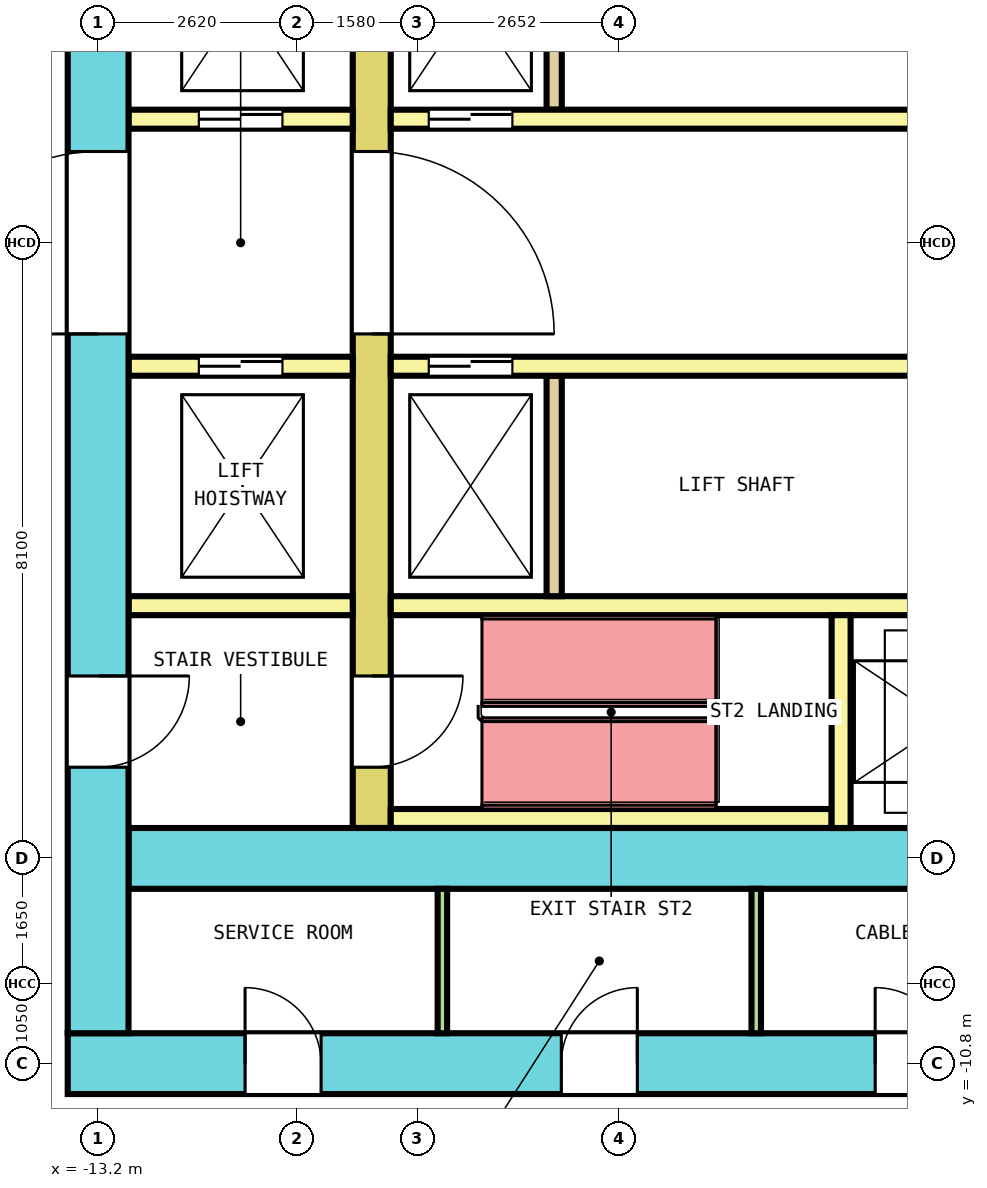
"""IFC4 building model, lengths in metres.
Left out: names, types, materials, properties, quantities, classifications, styles, units other than length and angle.
Written with IfcOpenShell. Run it as: python <this file> out.ifc"""

import sys

from ifc_helpers import new_model, si_unit, direction, frame, frame_2d, origin, place, context, subcontext, project, spatial, rectangle, extrude, element, fill, save


model = new_model("IFC4")
c1 = context("Model", 3, precision=1e-05, world=origin(), true_north=direction((0.0, 1.0)))
c2 = subcontext(c1, "Body", "Model", "MODEL_VIEW")
j1 = project(units=[si_unit("LENGTHUNIT", "METRE"), si_unit("PLANEANGLEUNIT", "RADIAN")], contexts=[c1])
p1 = place(None, origin())
s1 = spatial("IfcSite", under=j1, at=p1, CompositionType="ELEMENT")
p2 = place(p1, origin())
s2 = spatial("IfcBuilding", under=s1, at=p2, CompositionType="ELEMENT")
p3 = place(p2, frame((0.0, 0.0, 102.8)))
s3 = spatial("IfcBuildingStorey", under=s2, at=p3, CompositionType="ELEMENT", Elevation=102.8)
p4 = place(p3, frame((-13.6, -10.8, 0.0), z_axis=(0.0, 0.0, 1.0), x_axis=(1.0, 0.0, 0.0)))
e1 = element("IfcWall", 1, at=p4, inside=s3, PredefinedType="SHEAR", context=c2, shape_type="SweptSolid", body=[
    extrude(rectangle(XDim=27.2, YDim=0.8, at=frame_2d((13.6, 0.0))), origin(), (0.0, 0.0, 1.0), 4.1),
])
p5 = place(p4, frame((2.333, 0.0, 0.0)))
e2 = element("IfcOpeningElement", 2, at=p5, cuts=e1, PredefinedType="OPENING", context=c2, shape_type="SweptSolid", body=[
    extrude(rectangle(XDim=1.0, YDim=2.1, at=frame_2d((0.5, 1.05))), frame((0.0, 0.41, 0.0), z_axis=(0.0, -1.0, 0.0), x_axis=(1.0, 0.0, 0.0)), (0.0, 0.0, 1.0), 0.82),
])
p6 = place(p4, frame((6.494, 0.0, 0.0)))
e3 = element("IfcOpeningElement", 3, at=p6, cuts=e1, PredefinedType="OPENING", context=c2, shape_type="SweptSolid", body=[
    extrude(rectangle(XDim=1.0, YDim=2.1, at=frame_2d((0.5, 1.05))), frame((0.0, 0.41, 0.0), z_axis=(0.0, -1.0, 0.0), x_axis=(1.0, 0.0, 0.0)), (0.0, 0.0, 1.0), 0.82),
])
p7 = place(p4, frame((10.623, 0.0, 0.0)))
e4 = element("IfcOpeningElement", 4, at=p7, cuts=e1, PredefinedType="OPENING", context=c2, shape_type="SweptSolid", body=[
    extrude(rectangle(XDim=1.0, YDim=2.1, at=frame_2d((0.5, 1.05))), frame((0.0, 0.41, 0.0), z_axis=(0.0, -1.0, 0.0), x_axis=(1.0, 0.0, 0.0)), (0.0, 0.0, 1.0), 0.82),
])
p8 = place(p4, frame((19.16, 0.0, 0.0)))
e5 = element("IfcOpeningElement", 5, at=p8, cuts=e1, PredefinedType="OPENING", context=c2, shape_type="SweptSolid", body=[
    extrude(rectangle(XDim=1.0, YDim=2.1, at=frame_2d((0.5, 1.05))), frame((0.0, 0.41, 0.0), z_axis=(0.0, -1.0, 0.0), x_axis=(1.0, 0.0, 0.0)), (0.0, 0.0, 1.0), 0.82),
])
p9 = place(p4, frame((21.856, 0.0, 0.0)))
e6 = element("IfcOpeningElement", 6, at=p9, cuts=e1, PredefinedType="OPENING", context=c2, shape_type="SweptSolid", body=[
    extrude(rectangle(XDim=1.0, YDim=2.1, at=frame_2d((0.5, 1.05))), frame((0.0, 0.41, 0.0), z_axis=(0.0, -1.0, 0.0), x_axis=(1.0, 0.0, 0.0)), (0.0, 0.0, 1.0), 0.82),
])
p10 = place(p4, frame((24.583, 0.0, 0.0)))
e7 = element("IfcOpeningElement", 7, at=p10, cuts=e1, PredefinedType="OPENING", context=c2, shape_type="SweptSolid", body=[
    extrude(rectangle(XDim=1.0, YDim=2.1, at=frame_2d((0.5, 1.05))), frame((0.0, 0.41, 0.0), z_axis=(0.0, -1.0, 0.0), x_axis=(1.0, 0.0, 0.0)), (0.0, 0.0, 1.0), 0.82),
])
p11 = place(p4, frame((15.15, 0.0, 0.0)))
e8 = element("IfcOpeningElement", 8, at=p11, cuts=e1, PredefinedType="OPENING", context=c2, shape_type="SweptSolid", body=[
    extrude(rectangle(XDim=1.2, YDim=2.1, at=frame_2d((0.6, 1.05))), frame((0.0, 0.41, 0.0), z_axis=(0.0, -1.0, 0.0), x_axis=(1.0, 0.0, 0.0)), (0.0, 0.0, 1.0), 0.82),
])
p12 = place(p3, frame((-13.2, -10.4, 0.0), z_axis=(0.0, 0.0, 1.0), x_axis=(0.0, 1.0, 0.0)))
e9 = element("IfcWall", 9, at=p12, inside=s3, PredefinedType="SHEAR", context=c2, shape_type="SweptSolid", body=[
    extrude(rectangle(XDim=20.8, YDim=0.8, at=frame_2d((10.4, 0.0))), origin(), (0.0, 0.0, 1.0), 4.1),
])
p13 = place(p12, frame((9.2, 0.0, 0.0)))
e10 = element("IfcOpeningElement", 10, at=p13, cuts=e9, PredefinedType="OPENING", context=c2, shape_type="SweptSolid", body=[
    extrude(rectangle(XDim=2.4, YDim=2.1, at=frame_2d((1.2, 1.05))), frame((0.0, 0.41, 0.0), z_axis=(0.0, -1.0, 0.0), x_axis=(1.0, 0.0, 0.0)), (0.0, 0.0, 1.0), 0.82),
])
p14 = place(p12, frame((16.1, 0.0, 0.0)))
e11 = element("IfcOpeningElement", 11, at=p14, cuts=e9, PredefinedType="OPENING", context=c2, shape_type="SweptSolid", body=[
    extrude(rectangle(XDim=1.2, YDim=2.1, at=frame_2d((0.6, 1.05))), frame((0.0, 0.41, 0.0), z_axis=(0.0, -1.0, 0.0), x_axis=(1.0, 0.0, 0.0)), (0.0, 0.0, 1.0), 0.82),
])
p15 = place(p12, frame((3.5, 0.0, 0.0)))
e12 = element("IfcOpeningElement", 12, at=p15, cuts=e9, PredefinedType="OPENING", context=c2, shape_type="SweptSolid", body=[
    extrude(rectangle(XDim=1.2, YDim=2.1, at=frame_2d((0.6, 1.05))), frame((0.0, 0.41, 0.0), z_axis=(0.0, -1.0, 0.0), x_axis=(1.0, 0.0, 0.0)), (0.0, 0.0, 1.0), 0.82),
])
p16 = place(p3, frame((-12.8, -8.1, 0.0), z_axis=(0.0, 0.0, 1.0), x_axis=(1.0, 0.0, 0.0)))
e13 = element("IfcWall", 13, at=p16, inside=s3, PredefinedType="SHEAR", context=c2, shape_type="SweptSolid", body=[
    extrude(rectangle(XDim=25.6, YDim=0.8, at=frame_2d((12.8, 0.0))), origin(), (0.0, 0.0, 1.0), 4.1),
])
p17 = place(p16, frame((14.35, 0.0, 0.0)))
e14 = element("IfcOpeningElement", 14, at=p17, cuts=e13, PredefinedType="OPENING", context=c2, shape_type="SweptSolid", body=[
    extrude(rectangle(XDim=1.2, YDim=2.1, at=frame_2d((0.6, 1.05))), frame((0.0, 0.41, 0.0), z_axis=(0.0, -1.0, 0.0), x_axis=(1.0, 0.0, 0.0)), (0.0, 0.0, 1.0), 0.82),
])
p18 = place(p3, frame((-9.6, -7.7, 0.0), z_axis=(0.0, 0.0, 1.0), x_axis=(0.0, 1.0, 0.0)))
e15 = element("IfcWall", 15, at=p18, inside=s3, PredefinedType="SHEAR", context=c2, shape_type="SweptSolid", body=[
    extrude(rectangle(XDim=15.4, YDim=0.5, at=frame_2d((7.7, 0.0))), origin(), (0.0, 0.0, 1.0), 4.1),
])
p19 = place(p18, frame((6.5, 0.0, 0.0)))
e16 = element("IfcOpeningElement", 16, at=p19, cuts=e15, PredefinedType="OPENING", context=c2, shape_type="SweptSolid", body=[
    extrude(rectangle(XDim=2.4, YDim=2.1, at=frame_2d((1.2, 1.05))), frame((0.0, 0.26, 0.0), z_axis=(0.0, -1.0, 0.0), x_axis=(1.0, 0.0, 0.0)), (0.0, 0.0, 1.0), 0.52),
])
p20 = place(p18, frame((13.4, 0.0, 0.0)))
e17 = element("IfcOpeningElement", 17, at=p20, cuts=e15, PredefinedType="OPENING", context=c2, shape_type="SweptSolid", body=[
    extrude(rectangle(XDim=1.2, YDim=2.1, at=frame_2d((0.6, 1.05))), frame((0.0, 0.26, 0.0), z_axis=(0.0, -1.0, 0.0), x_axis=(1.0, 0.0, 0.0)), (0.0, 0.0, 1.0), 0.52),
])
p21 = place(p18, frame((0.8, 0.0, 0.0)))
e18 = element("IfcOpeningElement", 18, at=p21, cuts=e15, PredefinedType="OPENING", context=c2, shape_type="SweptSolid", body=[
    extrude(rectangle(XDim=1.2, YDim=2.1, at=frame_2d((0.6, 1.05))), frame((0.0, 0.26, 0.0), z_axis=(0.0, -1.0, 0.0), x_axis=(1.0, 0.0, 0.0)), (0.0, 0.0, 1.0), 0.52),
])
p22 = place(p3, frame((-12.8, 1.625, 0.0), z_axis=(0.0, 0.0, 1.0), x_axis=(1.0, 0.0, 0.0)))
e19 = element("IfcWall", 19, at=p22, inside=s3, PredefinedType="SOLIDWALL", context=c2, shape_type="SweptSolid", body=[
    extrude(rectangle(XDim=2.95, YDim=0.25, at=frame_2d((1.475, 0.0))), origin(), (0.0, 0.0, 1.0), 4.1),
])
p23 = place(p22, frame((0.925, 0.0, 0.0)))
e20 = element("IfcOpeningElement", 20, at=p23, cuts=e19, PredefinedType="OPENING", context=c2, shape_type="SweptSolid", body=[
    extrude(rectangle(XDim=1.1, YDim=2.1, at=frame_2d((0.55, 1.05))), frame((0.0, 0.135, 0.0), z_axis=(0.0, -1.0, 0.0), x_axis=(1.0, 0.0, 0.0)), (0.0, 0.0, 1.0), 0.27),
])
p24 = place(p3, frame((-9.35, 1.625, 0.0), z_axis=(0.0, 0.0, 1.0), x_axis=(1.0, 0.0, 0.0)))
e21 = element("IfcWall", 21, at=p24, inside=s3, PredefinedType="SOLIDWALL", context=c2, shape_type="SweptSolid", body=[
    extrude(rectangle(XDim=18.7, YDim=0.25, at=frame_2d((9.35, 0.0))), origin(), (0.0, 0.0, 1.0), 4.1),
])
p25 = place(p24, frame((0.5, 0.0, 0.0)))
e22 = element("IfcOpeningElement", 22, at=p25, cuts=e21, PredefinedType="OPENING", context=c2, shape_type="SweptSolid", body=[
    extrude(rectangle(XDim=1.1, YDim=2.1, at=frame_2d((0.55, 1.05))), frame((0.0, 0.135, 0.0), z_axis=(0.0, -1.0, 0.0), x_axis=(1.0, 0.0, 0.0)), (0.0, 0.0, 1.0), 0.27),
])
p26 = place(p24, frame((17.1, 0.0, 0.0)))
e23 = element("IfcOpeningElement", 23, at=p26, cuts=e21, PredefinedType="OPENING", context=c2, shape_type="SweptSolid", body=[
    extrude(rectangle(XDim=1.1, YDim=2.1, at=frame_2d((0.55, 1.05))), frame((0.0, 0.135, 0.0), z_axis=(0.0, -1.0, 0.0), x_axis=(1.0, 0.0, 0.0)), (0.0, 0.0, 1.0), 0.27),
])
p27 = place(p3, frame((-7.2, 1.75, 0.0), z_axis=(0.0, 0.0, 1.0), x_axis=(0.0, 1.0, 0.0)))
e24 = element("IfcWall", 24, at=p27, inside=s3, PredefinedType="SOLIDWALL", context=c2, shape_type="SweptSolid", body=[
    extrude(rectangle(XDim=2.9, YDim=0.2, at=frame_2d((1.45, 0.0))), origin(), (0.0, 0.0, 1.0), 4.1),
])
p28 = place(p3, frame((-12.8, -1.625, 0.0), z_axis=(0.0, 0.0, 1.0), x_axis=(1.0, 0.0, 0.0)))
e25 = element("IfcWall", 25, at=p28, inside=s3, PredefinedType="SOLIDWALL", context=c2, shape_type="SweptSolid", body=[
    extrude(rectangle(XDim=2.95, YDim=0.25, at=frame_2d((1.475, 0.0))), origin(), (0.0, 0.0, 1.0), 4.1),
])
p29 = place(p28, frame((0.925, 0.0, 0.0)))
e26 = element("IfcOpeningElement", 26, at=p29, cuts=e25, PredefinedType="OPENING", context=c2, shape_type="SweptSolid", body=[
    extrude(rectangle(XDim=1.1, YDim=2.1, at=frame_2d((0.55, 1.05))), frame((0.0, 0.135, 0.0), z_axis=(0.0, -1.0, 0.0), x_axis=(1.0, 0.0, 0.0)), (0.0, 0.0, 1.0), 0.27),
])
p30 = place(p3, frame((-9.35, -1.625, 0.0), z_axis=(0.0, 0.0, 1.0), x_axis=(1.0, 0.0, 0.0)))
e27 = element("IfcWall", 27, at=p30, inside=s3, PredefinedType="SOLIDWALL", context=c2, shape_type="SweptSolid", body=[
    extrude(rectangle(XDim=18.7, YDim=0.25, at=frame_2d((9.35, 0.0))), origin(), (0.0, 0.0, 1.0), 4.1),
])
p31 = place(p30, frame((0.5, 0.0, 0.0)))
e28 = element("IfcOpeningElement", 28, at=p31, cuts=e27, PredefinedType="OPENING", context=c2, shape_type="SweptSolid", body=[
    extrude(rectangle(XDim=1.1, YDim=2.1, at=frame_2d((0.55, 1.05))), frame((0.0, 0.135, 0.0), z_axis=(0.0, -1.0, 0.0), x_axis=(1.0, 0.0, 0.0)), (0.0, 0.0, 1.0), 0.27),
])
p32 = place(p30, frame((17.1, 0.0, 0.0)))
e29 = element("IfcOpeningElement", 29, at=p32, cuts=e27, PredefinedType="OPENING", context=c2, shape_type="SweptSolid", body=[
    extrude(rectangle(XDim=1.1, YDim=2.1, at=frame_2d((0.55, 1.05))), frame((0.0, 0.135, 0.0), z_axis=(0.0, -1.0, 0.0), x_axis=(1.0, 0.0, 0.0)), (0.0, 0.0, 1.0), 0.27),
])
p33 = place(p3, frame((-12.8, -4.775, 0.0), z_axis=(0.0, 0.0, 1.0), x_axis=(1.0, 0.0, 0.0)))
e30 = element("IfcWall", 30, at=p33, inside=s3, PredefinedType="SOLIDWALL", context=c2, shape_type="SweptSolid", body=[
    extrude(rectangle(XDim=2.95, YDim=0.25, at=frame_2d((1.475, 0.0))), origin(), (0.0, 0.0, 1.0), 4.1),
])
p34 = place(p3, frame((-9.35, -4.775, 0.0), z_axis=(0.0, 0.0, 1.0), x_axis=(1.0, 0.0, 0.0)))
e31 = element("IfcWall", 31, at=p34, inside=s3, PredefinedType="SOLIDWALL", context=c2, shape_type="SweptSolid", body=[
    extrude(rectangle(XDim=18.7, YDim=0.25, at=frame_2d((9.35, 0.0))), origin(), (0.0, 0.0, 1.0), 4.1),
])
p35 = place(p3, frame((-7.2, -4.65, 0.0), z_axis=(0.0, 0.0, 1.0), x_axis=(0.0, 1.0, 0.0)))
e32 = element("IfcWall", 32, at=p35, inside=s3, PredefinedType="SOLIDWALL", context=c2, shape_type="SweptSolid", body=[
    extrude(rectangle(XDim=2.9, YDim=0.2, at=frame_2d((1.45, 0.0))), origin(), (0.0, 0.0, 1.0), 4.1),
])
p36 = place(p3, frame((-9.35, -7.575, 0.0), z_axis=(0.0, 0.0, 1.0), x_axis=(1.0, 0.0, 0.0)))
e33 = element("IfcWall", 33, at=p36, inside=s3, PredefinedType="SOLIDWALL", context=c2, shape_type="SweptSolid", body=[
    extrude(rectangle(XDim=5.8, YDim=0.25, at=frame_2d((2.9, 0.0))), origin(), (0.0, 0.0, 1.0), 4.1),
])
p37 = place(p3, frame((-3.425, -7.7, 0.0), z_axis=(0.0, 0.0, 1.0), x_axis=(0.0, 1.0, 0.0)))
e34 = element("IfcWall", 34, at=p37, inside=s3, PredefinedType="SOLIDWALL", context=c2, shape_type="SweptSolid", body=[
    extrude(rectangle(XDim=2.8, YDim=0.25, at=frame_2d((1.4, 0.0))), origin(), (0.0, 0.0, 1.0), 4.1),
])
for number, where, z_axis, x_axis in (
    (35, (-8.671, -10.4, 0.0), (0.0, 0.0, 1.0), (0.0, 1.0, 0.0)),
    (36, (-4.542, -10.4, 0.0), (0.0, 0.0, 1.0), (0.0, 1.0, 0.0)),
):
    element("IfcWall", number, at=place(p3, frame(where, z_axis=z_axis, x_axis=x_axis)), inside=s3, PredefinedType="PARTITIONING", context=c2, shape_type="SweptSolid", body=[
        extrude(rectangle(XDim=1.9, YDim=0.125, at=frame_2d((0.95, 0.0))), origin(), (0.0, 0.0, 1.0), 4.1),
    ])
p38 = place(p23, origin())
e37 = element("IfcDoor", 37, at=p38, inside=s3, OperationType="DOUBLE_DOOR_SLIDING", PredefinedType="DOOR", context=c2, shape_type="SweptSolid", body=[
    extrude(rectangle(XDim=1.1, YDim=2.1, at=frame_2d((0.55, 1.05))), frame((0.0, 0.075, 0.0), z_axis=(0.0, -1.0, 0.0), x_axis=(1.0, 0.0, 0.0)), (0.0, 0.0, 1.0), 0.15),
])
fill(e20, e37)
p39 = place(p25, origin())
e38 = element("IfcDoor", 38, at=p39, inside=s3, OperationType="DOUBLE_DOOR_SLIDING", PredefinedType="DOOR", context=c2, shape_type="SweptSolid", body=[
    extrude(rectangle(XDim=1.1, YDim=2.1, at=frame_2d((0.55, 1.05))), frame((0.0, 0.075, 0.0), z_axis=(0.0, -1.0, 0.0), x_axis=(1.0, 0.0, 0.0)), (0.0, 0.0, 1.0), 0.15),
])
fill(e22, e38)
p40 = place(p29, origin())
e39 = element("IfcDoor", 39, at=p40, inside=s3, OperationType="DOUBLE_DOOR_SLIDING", PredefinedType="DOOR", context=c2, shape_type="SweptSolid", body=[
    extrude(rectangle(XDim=1.1, YDim=2.1, at=frame_2d((0.55, 1.05))), frame((0.0, 0.075, 0.0), z_axis=(0.0, -1.0, 0.0), x_axis=(1.0, 0.0, 0.0)), (0.0, 0.0, 1.0), 0.15),
])
fill(e26, e39)
p41 = place(p31, origin())
e40 = element("IfcDoor", 40, at=p41, inside=s3, OperationType="DOUBLE_DOOR_SLIDING", PredefinedType="DOOR", context=c2, shape_type="SweptSolid", body=[
    extrude(rectangle(XDim=1.1, YDim=2.1, at=frame_2d((0.55, 1.05))), frame((0.0, 0.075, 0.0), z_axis=(0.0, -1.0, 0.0), x_axis=(1.0, 0.0, 0.0)), (0.0, 0.0, 1.0), 0.15),
])
fill(e28, e40)
p42 = place(p19, origin())
e41 = element("IfcDoor", 41, at=p42, inside=s3, OperationType="DOUBLE_DOOR_SINGLE_SWING", PredefinedType="DOOR", context=c2, shape_type="SweptSolid", body=[
    extrude(rectangle(XDim=2.4, YDim=2.1, at=frame_2d((1.2, 1.05))), frame((0.0, 0.2, 0.0), z_axis=(0.0, -1.0, 0.0), x_axis=(1.0, 0.0, 0.0)), (0.0, 0.0, 1.0), 0.4),
])
fill(e16, e41)
p43 = place(p13, origin())
e42 = element("IfcDoor", 42, at=p43, inside=s3, OperationType="DOUBLE_DOOR_SINGLE_SWING", PredefinedType="DOOR", context=c2, shape_type="SweptSolid", body=[
    extrude(rectangle(XDim=2.4, YDim=2.1, at=frame_2d((1.2, 1.05))), frame((0.0, 0.3, 0.0), z_axis=(0.0, -1.0, 0.0), x_axis=(1.0, 0.0, 0.0)), (0.0, 0.0, 1.0), 0.6),
])
fill(e10, e42)
p44 = place(p21, origin())
e43 = element("IfcDoor", 43, at=p44, inside=s3, OperationType="SINGLE_SWING_LEFT", PredefinedType="DOOR", context=c2, shape_type="SweptSolid", body=[
    extrude(rectangle(XDim=1.2, YDim=2.1, at=frame_2d((0.6, 1.05))), frame((0.0, 0.2, 0.0), z_axis=(0.0, -1.0, 0.0), x_axis=(1.0, 0.0, 0.0)), (0.0, 0.0, 1.0), 0.4),
])
fill(e18, e43)
p45 = place(p15, origin())
e44 = element("IfcDoor", 44, at=p45, inside=s3, OperationType="SINGLE_SWING_RIGHT", PredefinedType="DOOR", context=c2, shape_type="SweptSolid", body=[
    extrude(rectangle(XDim=1.2, YDim=2.1, at=frame_2d((0.6, 1.05))), frame((0.0, 0.3, 0.0), z_axis=(0.0, -1.0, 0.0), x_axis=(1.0, 0.0, 0.0)), (0.0, 0.0, 1.0), 0.6),
])
fill(e12, e44)
p46 = place(p5, origin())
e45 = element("IfcDoor", 45, at=p46, inside=s3, OperationType="SINGLE_SWING_LEFT", PredefinedType="DOOR", context=c2, shape_type="SweptSolid", body=[
    extrude(rectangle(XDim=1.0, YDim=2.1, at=frame_2d((0.5, 1.05))), frame((0.0, 0.3, 0.0), z_axis=(0.0, -1.0, 0.0), x_axis=(1.0, 0.0, 0.0)), (0.0, 0.0, 1.0), 0.6),
])
fill(e2, e45)
p47 = place(p6, origin())
e46 = element("IfcDoor", 46, at=p47, inside=s3, OperationType="SINGLE_SWING_RIGHT", PredefinedType="DOOR", context=c2, shape_type="SweptSolid", body=[
    extrude(rectangle(XDim=1.0, YDim=2.1, at=frame_2d((0.5, 1.05))), frame((0.0, 0.3, 0.0), z_axis=(0.0, -1.0, 0.0), x_axis=(1.0, 0.0, 0.0)), (0.0, 0.0, 1.0), 0.6),
])
fill(e3, e46)
p48 = place(p7, origin())
e47 = element("IfcDoor", 47, at=p48, inside=s3, OperationType="SINGLE_SWING_LEFT", PredefinedType="DOOR", context=c2, shape_type="SweptSolid", body=[
    extrude(rectangle(XDim=1.0, YDim=2.1, at=frame_2d((0.5, 1.05))), frame((0.0, 0.3, 0.0), z_axis=(0.0, -1.0, 0.0), x_axis=(1.0, 0.0, 0.0)), (0.0, 0.0, 1.0), 0.6),
])
fill(e4, e47)
save(model, sys.argv[1])
